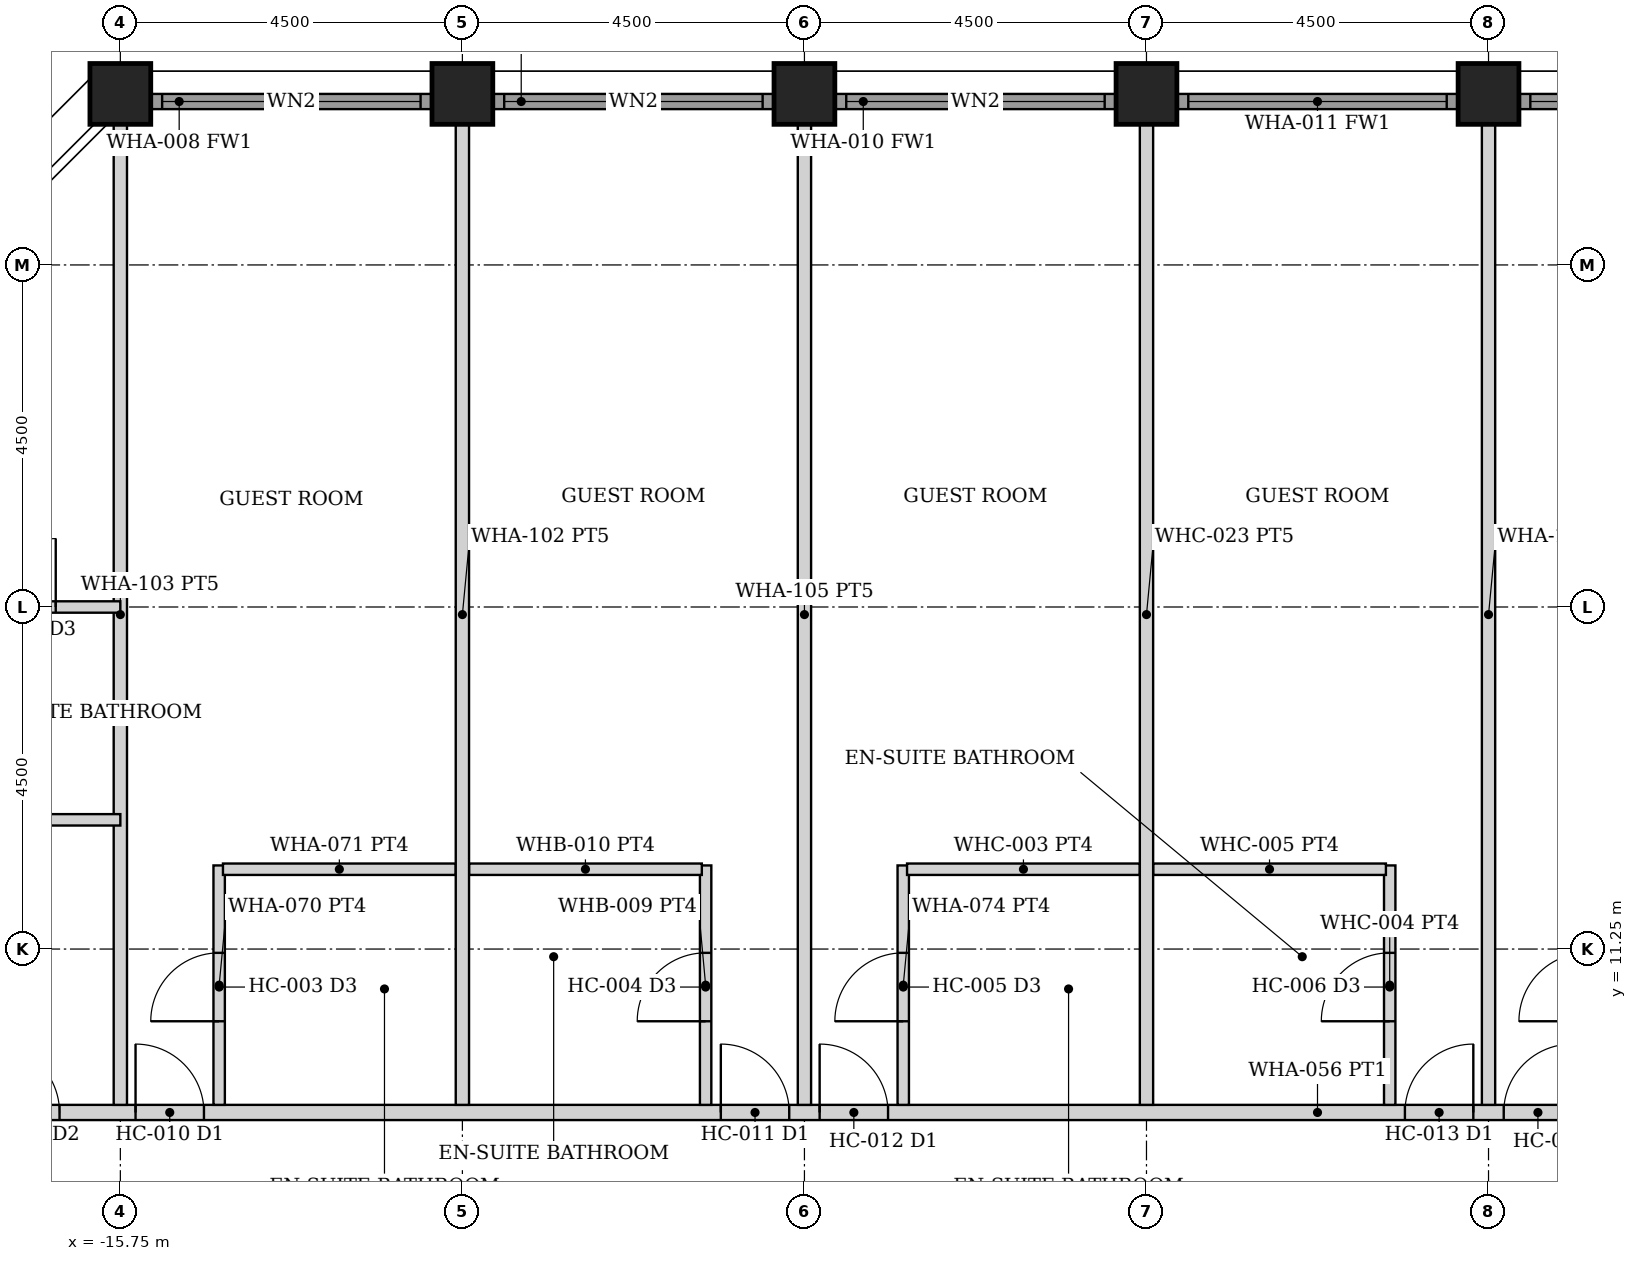
"""IFC4 building model, lengths in metres.
Left out: names, types, materials, properties, quantities, classifications, styles, units other than length and angle.
Written with IfcOpenShell. Run it as: python <this file> out.ifc"""

import sys

from ifc_helpers import new_model, si_unit, direction, frame, frame_2d, origin, origin_2d, place, context, subcontext, project, spatial, rectangle, hollow_rectangle, extrude, element, fill, save


model = new_model("IFC4")
c1 = context("Model", 3, precision=1e-05, world=origin(), true_north=direction((0.0, 1.0)))
c2 = subcontext(c1, "Body", "Model", "MODEL_VIEW")
j1 = project(units=[si_unit("LENGTHUNIT", "METRE"), si_unit("PLANEANGLEUNIT", "RADIAN")], contexts=[c1])
p1 = place(None, origin())
s1 = spatial("IfcSite", under=j1, at=p1, CompositionType="ELEMENT")
p2 = place(p1, origin())
s2 = spatial("IfcBuilding", under=s1, at=p2, CompositionType="ELEMENT")
p3 = place(p2, frame((0.0, 0.0, 140.0)))
s3 = spatial("IfcBuildingStorey", under=s2, at=p3, CompositionType="ELEMENT", Elevation=140.0)
for number, where, z_axis, x_axis in (
    (1, (-15.75, 22.5, 0.0), (0.0, 0.0, 1.0), (0.0, 1.0, 0.0)),
    (2, (-11.25, 22.5, 0.0), (0.0, 0.0, 1.0), (0.0, 1.0, 0.0)),
    (3, (-6.75, 22.5, 0.0), (0.0, 0.0, 1.0), (0.0, 1.0, 0.0)),
    (4, (-2.25, 22.5, 0.0), (0.0, 0.0, 1.0), (0.0, 1.0, 0.0)),
    (5, (2.25, 22.5, 0.0), (0.0, 0.0, 1.0), (0.0, 1.0, 0.0)),
):
    element("IfcColumn", number, at=place(p3, frame(where, z_axis=z_axis, x_axis=x_axis)), inside=s3, PredefinedType="COLUMN", context=c2, shape_type="SweptSolid", body=[
        extrude(hollow_rectangle(XDim=0.8, YDim=0.8, WallThickness=0.05, at=origin_2d()), origin(), (0.0, 0.0, 1.0), 3.6),
    ])
p4 = place(p3, frame((-15.345, 22.4, 0.0), z_axis=(0.0, 0.0, 1.0), x_axis=(1.0, 0.0, 0.0)))
e6 = element("IfcWall", 6, at=p4, inside=s3, PredefinedType="SOLIDWALL", context=c2, shape_type="SweptSolid", body=[
    extrude(rectangle(XDim=3.69, YDim=0.2, at=frame_2d((1.845, 0.0))), origin(), (0.0, 0.0, 1.0), 2.479),
])
p5 = place(p4, frame((0.145, 0.0, 0.3)))
e7 = element("IfcOpeningElement", 7, at=p5, cuts=e6, PredefinedType="OPENING", context=c2, shape_type="SweptSolid", body=[
    extrude(rectangle(XDim=3.4, YDim=2.029, at=frame_2d((1.7, 1.015))), frame((0.0, 0.11, 0.0), z_axis=(0.0, -1.0, 0.0), x_axis=(1.0, 0.0, 0.0)), (0.0, 0.0, 1.0), 0.22),
])
p6 = place(p3, frame((-10.845, 22.4, 0.0), z_axis=(0.0, 0.0, 1.0), x_axis=(1.0, 0.0, 0.0)))
e8 = element("IfcWall", 8, at=p6, inside=s3, PredefinedType="SOLIDWALL", context=c2, shape_type="SweptSolid", body=[
    extrude(rectangle(XDim=3.69, YDim=0.2, at=frame_2d((1.845, 0.0))), origin(), (0.0, 0.0, 1.0), 2.479),
])
p7 = place(p6, frame((0.145, 0.0, 0.3)))
e9 = element("IfcOpeningElement", 9, at=p7, cuts=e8, PredefinedType="OPENING", context=c2, shape_type="SweptSolid", body=[
    extrude(rectangle(XDim=3.4, YDim=2.029, at=frame_2d((1.7, 1.015))), frame((0.0, 0.11, 0.0), z_axis=(0.0, -1.0, 0.0), x_axis=(1.0, 0.0, 0.0)), (0.0, 0.0, 1.0), 0.22),
])
p8 = place(p3, frame((-6.345, 22.4, 0.0), z_axis=(0.0, 0.0, 1.0), x_axis=(1.0, 0.0, 0.0)))
e10 = element("IfcWall", 10, at=p8, inside=s3, PredefinedType="SOLIDWALL", context=c2, shape_type="SweptSolid", body=[
    extrude(rectangle(XDim=3.69, YDim=0.2, at=frame_2d((1.845, 0.0))), origin(), (0.0, 0.0, 1.0), 2.479),
])
p9 = place(p8, frame((0.145, 0.0, 0.3)))
e11 = element("IfcOpeningElement", 11, at=p9, cuts=e10, PredefinedType="OPENING", context=c2, shape_type="SweptSolid", body=[
    extrude(rectangle(XDim=3.4, YDim=2.029, at=frame_2d((1.7, 1.015))), frame((0.0, 0.11, 0.0), z_axis=(0.0, -1.0, 0.0), x_axis=(1.0, 0.0, 0.0)), (0.0, 0.0, 1.0), 0.22),
])
p10 = place(p3, frame((-1.845, 22.4, 0.0), z_axis=(0.0, 0.0, 1.0), x_axis=(1.0, 0.0, 0.0)))
e12 = element("IfcWall", 12, at=p10, inside=s3, PredefinedType="SOLIDWALL", context=c2, shape_type="SweptSolid", body=[
    extrude(rectangle(XDim=3.69, YDim=0.2, at=frame_2d((1.845, 0.0))), origin(), (0.0, 0.0, 1.0), 2.479),
])
p11 = place(p10, frame((0.145, 0.0, 0.3)))
e13 = element("IfcOpeningElement", 13, at=p11, cuts=e12, PredefinedType="OPENING", context=c2, shape_type="SweptSolid", body=[
    extrude(rectangle(XDim=3.4, YDim=2.029, at=frame_2d((1.7, 1.015))), frame((0.0, 0.11, 0.0), z_axis=(0.0, -1.0, 0.0), x_axis=(1.0, 0.0, 0.0)), (0.0, 0.0, 1.0), 0.22),
])
p12 = place(p3, frame((2.655, 22.4, 0.0), z_axis=(0.0, 0.0, 1.0), x_axis=(1.0, 0.0, 0.0)))
e14 = element("IfcWall", 14, at=p12, inside=s3, PredefinedType="SOLIDWALL", context=c2, shape_type="SweptSolid", body=[
    extrude(rectangle(XDim=3.69, YDim=0.2, at=frame_2d((1.845, 0.0))), origin(), (0.0, 0.0, 1.0), 2.479),
])
p13 = place(p12, frame((0.145, 0.0, 0.3)))
e15 = element("IfcOpeningElement", 15, at=p13, cuts=e14, PredefinedType="OPENING", context=c2, shape_type="SweptSolid", body=[
    extrude(rectangle(XDim=3.4, YDim=2.029, at=frame_2d((1.7, 1.015))), frame((0.0, 0.11, 0.0), z_axis=(0.0, -1.0, 0.0), x_axis=(1.0, 0.0, 0.0)), (0.0, 0.0, 1.0), 0.22),
])
p14 = place(p3, frame((-22.3, 9.1, 0.0), z_axis=(0.0, 0.0, 1.0), x_axis=(1.0, 0.0, 0.0)))
e16 = element("IfcWall", 16, at=p14, inside=s3, PredefinedType="PARTITIONING", context=c2, shape_type="SweptSolid", body=[
    extrude(rectangle(XDim=44.6, YDim=0.2, at=frame_2d((22.3, 0.0))), origin(), (0.0, 0.0, 1.0), 2.473),
])
p15 = place(p14, frame((6.75, 0.0, 0.0)))
e17 = element("IfcOpeningElement", 17, at=p15, cuts=e16, PredefinedType="OPENING", context=c2, shape_type="SweptSolid", body=[
    extrude(rectangle(XDim=0.9, YDim=2.1, at=frame_2d((0.45, 1.05))), frame((0.0, 0.11, 0.0), z_axis=(0.0, -1.0, 0.0), x_axis=(1.0, 0.0, 0.0)), (0.0, 0.0, 1.0), 0.22),
])
p16 = place(p14, frame((14.45, 0.0, 0.0)))
e18 = element("IfcOpeningElement", 18, at=p16, cuts=e16, PredefinedType="OPENING", context=c2, shape_type="SweptSolid", body=[
    extrude(rectangle(XDim=0.9, YDim=2.1, at=frame_2d((0.45, 1.05))), frame((0.0, 0.11, 0.0), z_axis=(0.0, -1.0, 0.0), x_axis=(1.0, 0.0, 0.0)), (0.0, 0.0, 1.0), 0.22),
])
p17 = place(p14, frame((15.75, 0.0, 0.0)))
e19 = element("IfcOpeningElement", 19, at=p17, cuts=e16, PredefinedType="OPENING", context=c2, shape_type="SweptSolid", body=[
    extrude(rectangle(XDim=0.9, YDim=2.1, at=frame_2d((0.45, 1.05))), frame((0.0, 0.11, 0.0), z_axis=(0.0, -1.0, 0.0), x_axis=(1.0, 0.0, 0.0)), (0.0, 0.0, 1.0), 0.22),
])
p18 = place(p14, frame((23.45, 0.0, 0.0)))
e20 = element("IfcOpeningElement", 20, at=p18, cuts=e16, PredefinedType="OPENING", context=c2, shape_type="SweptSolid", body=[
    extrude(rectangle(XDim=0.9, YDim=2.1, at=frame_2d((0.45, 1.05))), frame((0.0, 0.11, 0.0), z_axis=(0.0, -1.0, 0.0), x_axis=(1.0, 0.0, 0.0)), (0.0, 0.0, 1.0), 0.22),
])
p19 = place(p14, frame((24.75, 0.0, 0.0)))
e21 = element("IfcOpeningElement", 21, at=p19, cuts=e16, PredefinedType="OPENING", context=c2, shape_type="SweptSolid", body=[
    extrude(rectangle(XDim=0.9, YDim=2.1, at=frame_2d((0.45, 1.05))), frame((0.0, 0.11, 0.0), z_axis=(0.0, -1.0, 0.0), x_axis=(1.0, 0.0, 0.0)), (0.0, 0.0, 1.0), 0.22),
])
p20 = place(p14, frame((36.95, 0.0, 0.0)))
e22 = element("IfcOpeningElement", 22, at=p20, cuts=e16, PredefinedType="OPENING", context=c2, shape_type="SweptSolid", body=[
    extrude(rectangle(XDim=0.9, YDim=2.1, at=frame_2d((0.45, 1.05))), frame((0.0, 0.11, 0.0), z_axis=(0.0, -1.0, 0.0), x_axis=(1.0, 0.0, 0.0)), (0.0, 0.0, 1.0), 0.22),
])
p21 = place(p14, frame((38.85, 0.0, 0.0)))
e23 = element("IfcOpeningElement", 23, at=p21, cuts=e16, PredefinedType="OPENING", context=c2, shape_type="SweptSolid", body=[
    extrude(rectangle(XDim=0.9, YDim=2.1, at=frame_2d((0.45, 1.05))), frame((0.0, 0.11, 0.0), z_axis=(0.0, -1.0, 0.0), x_axis=(1.0, 0.0, 0.0)), (0.0, 0.0, 1.0), 0.22),
])
p22 = place(p14, frame((4.85, 0.0, 0.0)))
e24 = element("IfcOpeningElement", 24, at=p22, cuts=e16, PredefinedType="OPENING", context=c2, shape_type="SweptSolid", body=[
    extrude(rectangle(XDim=0.9, YDim=2.1, at=frame_2d((0.45, 1.05))), frame((0.0, 0.11, 0.0), z_axis=(0.0, -1.0, 0.0), x_axis=(1.0, 0.0, 0.0)), (0.0, 0.0, 1.0), 0.22),
])
p23 = place(p3, frame((-14.45, 9.2, 0.0), z_axis=(0.0, 0.0, 1.0), x_axis=(0.0, 1.0, 0.0)))
e25 = element("IfcWall", 25, at=p23, inside=s3, PredefinedType="PARTITIONING", context=c2, shape_type="SweptSolid", body=[
    extrude(rectangle(XDim=3.15, YDim=0.15, at=frame_2d((1.575, 0.0))), origin(), (0.0, 0.0, 1.0), 2.473),
])
p24 = place(p23, frame((1.1, 0.0, 0.0)))
e26 = element("IfcOpeningElement", 26, at=p24, cuts=e25, PredefinedType="OPENING", context=c2, shape_type="SweptSolid", body=[
    extrude(rectangle(XDim=0.9, YDim=2.1, at=frame_2d((0.45, 1.05))), frame((0.0, 0.085, 0.0), z_axis=(0.0, -1.0, 0.0), x_axis=(1.0, 0.0, 0.0)), (0.0, 0.0, 1.0), 0.17),
])
p25 = place(p3, frame((-14.4, 12.3, 0.0), z_axis=(0.0, 0.0, 1.0), x_axis=(1.0, 0.0, 0.0)))
e27 = element("IfcWall", 27, at=p25, inside=s3, PredefinedType="PARTITIONING", context=c2, shape_type="SweptSolid", body=[
    extrude(rectangle(XDim=3.062, YDim=0.15, at=frame_2d((1.531, 0.0))), origin(), (0.0, 0.0, 1.0), 2.473),
])
p26 = place(p3, frame((-8.05, 9.2, 0.0), z_axis=(0.0, 0.0, 1.0), x_axis=(0.0, 1.0, 0.0)))
e28 = element("IfcWall", 28, at=p26, inside=s3, PredefinedType="PARTITIONING", context=c2, shape_type="SweptSolid", body=[
    extrude(rectangle(XDim=3.15, YDim=0.15, at=frame_2d((1.575, 0.0))), origin(), (0.0, 0.0, 1.0), 2.473),
])
p27 = place(p26, frame((1.1, 0.0, 0.0)))
e29 = element("IfcOpeningElement", 29, at=p27, cuts=e28, PredefinedType="OPENING", context=c2, shape_type="SweptSolid", body=[
    extrude(rectangle(XDim=0.9, YDim=2.1, at=frame_2d((0.45, 1.05))), frame((0.0, 0.085, 0.0), z_axis=(0.0, -1.0, 0.0), x_axis=(1.0, 0.0, 0.0)), (0.0, 0.0, 1.0), 0.17),
])
p28 = place(p3, frame((-11.163, 12.3, 0.0), z_axis=(0.0, 0.0, 1.0), x_axis=(1.0, 0.0, 0.0)))
e30 = element("IfcWall", 30, at=p28, inside=s3, PredefinedType="PARTITIONING", context=c2, shape_type="SweptSolid", body=[
    extrude(rectangle(XDim=3.062, YDim=0.15, at=frame_2d((1.531, 0.0))), origin(), (0.0, 0.0, 1.0), 2.473),
])
p29 = place(p3, frame((-5.45, 9.2, 0.0), z_axis=(0.0, 0.0, 1.0), x_axis=(0.0, 1.0, 0.0)))
e31 = element("IfcWall", 31, at=p29, inside=s3, PredefinedType="PARTITIONING", context=c2, shape_type="SweptSolid", body=[
    extrude(rectangle(XDim=3.15, YDim=0.15, at=frame_2d((1.575, 0.0))), origin(), (0.0, 0.0, 1.0), 2.473),
])
p30 = place(p29, frame((1.1, 0.0, 0.0)))
e32 = element("IfcOpeningElement", 32, at=p30, cuts=e31, PredefinedType="OPENING", context=c2, shape_type="SweptSolid", body=[
    extrude(rectangle(XDim=0.9, YDim=2.1, at=frame_2d((0.45, 1.05))), frame((0.0, 0.085, 0.0), z_axis=(0.0, -1.0, 0.0), x_axis=(1.0, 0.0, 0.0)), (0.0, 0.0, 1.0), 0.17),
])
p31 = place(p3, frame((-5.4, 12.3, 0.0), z_axis=(0.0, 0.0, 1.0), x_axis=(1.0, 0.0, 0.0)))
e33 = element("IfcWall", 33, at=p31, inside=s3, PredefinedType="PARTITIONING", context=c2, shape_type="SweptSolid", body=[
    extrude(rectangle(XDim=3.062, YDim=0.15, at=frame_2d((1.531, 0.0))), origin(), (0.0, 0.0, 1.0), 2.473),
])
p32 = place(p3, frame((0.95, 9.2, 0.0), z_axis=(0.0, 0.0, 1.0), x_axis=(0.0, 1.0, 0.0)))
e34 = element("IfcWall", 34, at=p32, inside=s3, PredefinedType="PARTITIONING", context=c2, shape_type="SweptSolid", body=[
    extrude(rectangle(XDim=3.15, YDim=0.15, at=frame_2d((1.575, 0.0))), origin(), (0.0, 0.0, 1.0), 2.473),
])
p33 = place(p32, frame((1.1, 0.0, 0.0)))
e35 = element("IfcOpeningElement", 35, at=p33, cuts=e34, PredefinedType="OPENING", context=c2, shape_type="SweptSolid", body=[
    extrude(rectangle(XDim=0.9, YDim=2.1, at=frame_2d((0.45, 1.05))), frame((0.0, 0.085, 0.0), z_axis=(0.0, -1.0, 0.0), x_axis=(1.0, 0.0, 0.0)), (0.0, 0.0, 1.0), 0.17),
])
p34 = place(p3, frame((-2.163, 12.3, 0.0), z_axis=(0.0, 0.0, 1.0), x_axis=(1.0, 0.0, 0.0)))
e36 = element("IfcWall", 36, at=p34, inside=s3, PredefinedType="PARTITIONING", context=c2, shape_type="SweptSolid", body=[
    extrude(rectangle(XDim=3.062, YDim=0.15, at=frame_2d((1.531, 0.0))), origin(), (0.0, 0.0, 1.0), 2.473),
])
for number, where, z_axis, x_axis in (
    (37, (-15.75, 9.2, 0.0), (0.0, 0.0, 1.0), (0.0, 1.0, 0.0)),
    (38, (-11.25, 9.2, 0.0), (0.0, 0.0, 1.0), (0.0, 1.0, 0.0)),
    (39, (-6.75, 9.2, 0.0), (0.0, 0.0, 1.0), (0.0, 1.0, 0.0)),
    (40, (-2.25, 9.2, 0.0), (0.0, 0.0, 1.0), (0.0, 1.0, 0.0)),
    (41, (2.25, 9.2, 0.0), (0.0, 0.0, 1.0), (0.0, 1.0, 0.0)),
):
    element("IfcWall", number, at=place(p3, frame(where, z_axis=z_axis, x_axis=x_axis)), inside=s3, PredefinedType="PARTITIONING", context=c2, shape_type="SweptSolid", body=[
        extrude(rectangle(XDim=12.9, YDim=0.175, at=frame_2d((6.45, 0.0))), origin(), (0.0, 0.0, 1.0), 2.473),
    ])
p35 = place(p3, frame((-18.55, 12.95, 0.0), z_axis=(0.0, 0.0, 1.0), x_axis=(1.0, 0.0, 0.0)))
e42 = element("IfcWall", 42, at=p35, inside=s3, PredefinedType="PARTITIONING", context=c2, shape_type="SweptSolid", body=[
    extrude(rectangle(XDim=2.8, YDim=0.15, at=frame_2d((1.4, 0.0))), origin(), (0.0, 0.0, 1.0), 2.473),
])
p36 = place(p3, frame((-18.55, 15.75, 0.0), z_axis=(0.0, 0.0, 1.0), x_axis=(1.0, 0.0, 0.0)))
e43 = element("IfcWall", 43, at=p36, inside=s3, PredefinedType="PARTITIONING", context=c2, shape_type="SweptSolid", body=[
    extrude(rectangle(XDim=2.8, YDim=0.15, at=frame_2d((1.4, 0.0))), origin(), (0.0, 0.0, 1.0), 2.473),
])
p37 = place(p36, frame((1.05, 0.0, 0.0)))
e44 = element("IfcOpeningElement", 44, at=p37, cuts=e43, PredefinedType="OPENING", context=c2, shape_type="SweptSolid", body=[
    extrude(rectangle(XDim=0.9, YDim=2.1, at=frame_2d((0.45, 1.05))), frame((0.0, 0.085, 0.0), z_axis=(0.0, -1.0, 0.0), x_axis=(1.0, 0.0, 0.0)), (0.0, 0.0, 1.0), 0.17),
])
p38 = place(p5, origin())
e45 = element("IfcWindow", 45, at=p38, inside=s3, PartitioningType="SINGLE_PANEL", PredefinedType="WINDOW", context=c2, shape_type="SweptSolid", body=[
    extrude(rectangle(XDim=3.4, YDim=2.029, at=frame_2d((1.7, 1.015))), frame((0.0, 0.03, 0.0), z_axis=(0.0, -1.0, 0.0), x_axis=(1.0, 0.0, 0.0)), (0.0, 0.0, 1.0), 0.06),
])
fill(e7, e45)
p39 = place(p7, origin())
e46 = element("IfcWindow", 46, at=p39, inside=s3, PartitioningType="SINGLE_PANEL", PredefinedType="WINDOW", context=c2, shape_type="SweptSolid", body=[
    extrude(rectangle(XDim=3.4, YDim=2.029, at=frame_2d((1.7, 1.015))), frame((0.0, 0.03, 0.0), z_axis=(0.0, -1.0, 0.0), x_axis=(1.0, 0.0, 0.0)), (0.0, 0.0, 1.0), 0.06),
])
fill(e9, e46)
p40 = place(p9, origin())
e47 = element("IfcWindow", 47, at=p40, inside=s3, PartitioningType="SINGLE_PANEL", PredefinedType="WINDOW", context=c2, shape_type="SweptSolid", body=[
    extrude(rectangle(XDim=3.4, YDim=2.029, at=frame_2d((1.7, 1.015))), frame((0.0, 0.03, 0.0), z_axis=(0.0, -1.0, 0.0), x_axis=(1.0, 0.0, 0.0)), (0.0, 0.0, 1.0), 0.06),
])
fill(e11, e47)
p41 = place(p11, origin())
e48 = element("IfcWindow", 48, at=p41, inside=s3, PartitioningType="SINGLE_PANEL", PredefinedType="WINDOW", context=c2, shape_type="SweptSolid", body=[
    extrude(rectangle(XDim=3.4, YDim=2.029, at=frame_2d((1.7, 1.015))), frame((0.0, 0.03, 0.0), z_axis=(0.0, -1.0, 0.0), x_axis=(1.0, 0.0, 0.0)), (0.0, 0.0, 1.0), 0.06),
])
fill(e13, e48)
p42 = place(p13, origin())
e49 = element("IfcWindow", 49, at=p42, inside=s3, PartitioningType="SINGLE_PANEL", PredefinedType="WINDOW", context=c2, shape_type="SweptSolid", body=[
    extrude(rectangle(XDim=3.4, YDim=2.029, at=frame_2d((1.7, 1.015))), frame((0.0, 0.03, 0.0), z_axis=(0.0, -1.0, 0.0), x_axis=(1.0, 0.0, 0.0)), (0.0, 0.0, 1.0), 0.06),
])
fill(e15, e49)
p43 = place(p15, origin())
e50 = element("IfcDoor", 50, at=p43, inside=s3, OperationType="SINGLE_SWING_LEFT", PredefinedType="DOOR", context=c2, shape_type="SweptSolid", body=[
    extrude(rectangle(XDim=0.9, YDim=2.1, at=frame_2d((0.45, 1.05))), frame((0.0, 0.025, 0.0), z_axis=(0.0, -1.0, 0.0), x_axis=(1.0, 0.0, 0.0)), (0.0, 0.0, 1.0), 0.05),
])
fill(e17, e50)
p44 = place(p24, origin())
e51 = element("IfcDoor", 51, at=p44, inside=s3, OperationType="SINGLE_SWING_LEFT", PredefinedType="DOOR", context=c2, shape_type="SweptSolid", body=[
    extrude(rectangle(XDim=0.9, YDim=2.1, at=frame_2d((0.45, 1.05))), frame((0.0, 0.025, 0.0), z_axis=(0.0, -1.0, 0.0), x_axis=(1.0, 0.0, 0.0)), (0.0, 0.0, 1.0), 0.05),
])
fill(e26, e51)
p45 = place(p16, origin())
e52 = element("IfcDoor", 52, at=p45, inside=s3, OperationType="SINGLE_SWING_LEFT", PredefinedType="DOOR", context=c2, shape_type="SweptSolid", body=[
    extrude(rectangle(XDim=0.9, YDim=2.1, at=frame_2d((0.45, 1.05))), frame((0.0, 0.025, 0.0), z_axis=(0.0, -1.0, 0.0), x_axis=(1.0, 0.0, 0.0)), (0.0, 0.0, 1.0), 0.05),
])
fill(e18, e52)
p46 = place(p27, origin())
e53 = element("IfcDoor", 53, at=p46, inside=s3, OperationType="SINGLE_SWING_LEFT", PredefinedType="DOOR", context=c2, shape_type="SweptSolid", body=[
    extrude(rectangle(XDim=0.9, YDim=2.1, at=frame_2d((0.45, 1.05))), frame((0.0, 0.025, 0.0), z_axis=(0.0, -1.0, 0.0), x_axis=(1.0, 0.0, 0.0)), (0.0, 0.0, 1.0), 0.05),
])
fill(e29, e53)
p47 = place(p17, origin())
e54 = element("IfcDoor", 54, at=p47, inside=s3, OperationType="SINGLE_SWING_LEFT", PredefinedType="DOOR", context=c2, shape_type="SweptSolid", body=[
    extrude(rectangle(XDim=0.9, YDim=2.1, at=frame_2d((0.45, 1.05))), frame((0.0, 0.025, 0.0), z_axis=(0.0, -1.0, 0.0), x_axis=(1.0, 0.0, 0.0)), (0.0, 0.0, 1.0), 0.05),
])
fill(e19, e54)
p48 = place(p30, origin())
e55 = element("IfcDoor", 55, at=p48, inside=s3, OperationType="SINGLE_SWING_LEFT", PredefinedType="DOOR", context=c2, shape_type="SweptSolid", body=[
    extrude(rectangle(XDim=0.9, YDim=2.1, at=frame_2d((0.45, 1.05))), frame((0.0, 0.025, 0.0), z_axis=(0.0, -1.0, 0.0), x_axis=(1.0, 0.0, 0.0)), (0.0, 0.0, 1.0), 0.05),
])
fill(e32, e55)
p49 = place(p18, origin())
e56 = element("IfcDoor", 56, at=p49, inside=s3, OperationType="SINGLE_SWING_RIGHT", PredefinedType="DOOR", context=c2, shape_type="SweptSolid", body=[
    extrude(rectangle(XDim=0.9, YDim=2.1, at=frame_2d((0.45, 1.05))), frame((0.0, 0.025, 0.0), z_axis=(0.0, -1.0, 0.0), x_axis=(1.0, 0.0, 0.0)), (0.0, 0.0, 1.0), 0.05),
])
fill(e20, e56)
p50 = place(p33, origin())
e57 = element("IfcDoor", 57, at=p50, inside=s3, OperationType="SINGLE_SWING_LEFT", PredefinedType="DOOR", context=c2, shape_type="SweptSolid", body=[
    extrude(rectangle(XDim=0.9, YDim=2.1, at=frame_2d((0.45, 1.05))), frame((0.0, 0.025, 0.0), z_axis=(0.0, -1.0, 0.0), x_axis=(1.0, 0.0, 0.0)), (0.0, 0.0, 1.0), 0.05),
])
fill(e35, e57)
p51 = place(p19, origin())
e58 = element("IfcDoor", 58, at=p51, inside=s3, OperationType="SINGLE_SWING_RIGHT", PredefinedType="DOOR", context=c2, shape_type="SweptSolid", body=[
    extrude(rectangle(XDim=0.9, YDim=2.1, at=frame_2d((0.45, 1.05))), frame((0.0, 0.025, 0.0), z_axis=(0.0, -1.0, 0.0), x_axis=(1.0, 0.0, 0.0)), (0.0, 0.0, 1.0), 0.05),
])
fill(e21, e58)
p52 = place(p22, origin())
e59 = element("IfcDoor", 59, at=p52, inside=s3, OperationType="SINGLE_SWING_LEFT", PredefinedType="DOOR", context=c2, shape_type="SweptSolid", body=[
    extrude(rectangle(XDim=0.9, YDim=2.1, at=frame_2d((0.45, 1.05))), frame((0.0, 0.025, 0.0), z_axis=(0.0, -1.0, 0.0), x_axis=(1.0, 0.0, 0.0)), (0.0, 0.0, 1.0), 0.05),
])
fill(e24, e59)
p53 = place(p37, origin())
e60 = element("IfcDoor", 60, at=p53, inside=s3, OperationType="SINGLE_SWING_RIGHT", PredefinedType="DOOR", context=c2, shape_type="SweptSolid", body=[
    extrude(rectangle(XDim=0.9, YDim=2.1, at=frame_2d((0.45, 1.05))), frame((0.0, 0.025, 0.0), z_axis=(0.0, -1.0, 0.0), x_axis=(1.0, 0.0, 0.0)), (0.0, 0.0, 1.0), 0.05),
])
fill(e44, e60)
save(model, sys.argv[1])
